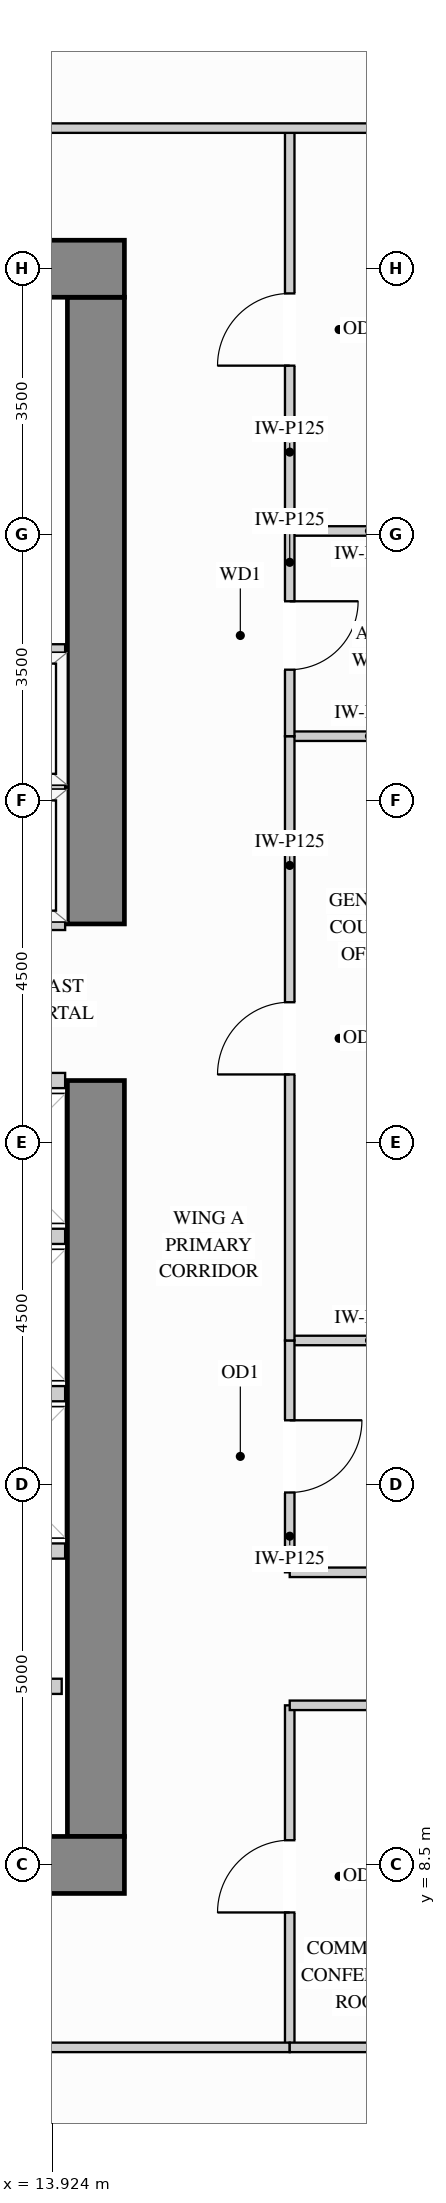
"""IFC4 building model, lengths in metres.
Left out: names, types, materials, properties, quantities, classifications, styles, units other than length and angle.
Written with IfcOpenShell. Run it as: python <this file> out.ifc"""

import sys

from ifc_helpers import new_model, si_unit, direction, frame, frame_2d, origin, place, context, subcontext, project, spatial, rectangle, extrude, source, transform, mapped, element, fill, save


model = new_model("IFC4")
c1 = context("Model", 3, precision=1e-05, world=origin(), true_north=direction((0.0, 1.0)))
c2 = subcontext(c1, "Body", "Model", "MODEL_VIEW")
j1 = project(units=[si_unit("LENGTHUNIT", "METRE"), si_unit("PLANEANGLEUNIT", "RADIAN")], contexts=[c1])
p1 = place(None, origin())
s1 = spatial("IfcSite", under=j1, at=p1, CompositionType="ELEMENT")
p2 = place(p1, origin())
s2 = spatial("IfcBuilding", under=s1, at=p2, CompositionType="ELEMENT")
p3 = place(p2, frame((0.0, 0.0, 88.2)))
s3 = spatial("IfcBuildingStorey", under=s2, at=p3, CompositionType="ELEMENT", Elevation=88.2)
m1 = source(origin(), c2, "Body", "SweptSolid", [
    extrude(rectangle(XDim=9.945, YDim=0.75, at=frame_2d((4.973, 0.0))), origin(), (0.0, 0.0, 1.0), 3.38),
])
p4 = place(p3, frame((14.5, 8.875, 0.0), z_axis=(0.0, 0.0, 1.0), x_axis=(0.0, 1.0, 0.0)))
e1 = element("IfcWall", 1, at=p4, inside=s3, PredefinedType="SHEAR", context=c2, shape_type="MappedRepresentation", body=[
    mapped(m1, transform((0.0, 0.0, 0.0), x_axis=(1.0, 0.0, 0.0), y_axis=(0.0, 1.0, 0.0), z_axis=(0.0, 0.0, 1.0))),
])
m2 = source(origin(), c2, "Body", "SweptSolid", [
    extrude(rectangle(XDim=8.245, YDim=0.75, at=frame_2d((4.123, 0.0))), origin(), (0.0, 0.0, 1.0), 3.38),
])
p5 = place(p3, frame((14.5, 20.88, 0.0), z_axis=(0.0, 0.0, 1.0), x_axis=(0.0, 1.0, 0.0)))
e2 = element("IfcWall", 2, at=p5, inside=s3, PredefinedType="SHEAR", context=c2, shape_type="MappedRepresentation", body=[
    mapped(m2, transform((0.0, 0.0, 0.0), x_axis=(1.0, 0.0, 0.0), y_axis=(0.0, 1.0, 0.0), z_axis=(0.0, 0.0, 1.0))),
])
m3 = source(origin(), c2, "Body", "SweptSolid", [
    extrude(rectangle(XDim=10.75, YDim=0.75, at=frame_2d((5.375, 0.0))), origin(), (0.0, 0.0, 1.0), 3.38),
])
for number, where, z_axis, x_axis in (
    (3, (4.125, 29.5, 0.0), (0.0, 0.0, 1.0), (1.0, 0.0, 0.0)),
    (4, (4.125, 8.5, 0.0), (0.0, 0.0, 1.0), (1.0, 0.0, 0.0)),
):
    element("IfcWall", number, at=place(p3, frame(where, z_axis=z_axis, x_axis=x_axis)), inside=s3, PredefinedType="SHEAR", context=c2, shape_type="MappedRepresentation", body=[
        mapped(m3, transform((0.0, 0.0, 0.0), x_axis=(1.0, 0.0, 0.0), y_axis=(0.0, 1.0, 0.0), z_axis=(0.0, 0.0, 1.0))),
    ])
m4 = source(origin(), c2, "Body", "SweptSolid", [
    extrude(rectangle(XDim=2.1, YDim=0.125, at=frame_2d((1.05, 0.0))), origin(), (0.0, 0.0, 1.0), 3.365),
])
p6 = place(p3, frame((17.05, 15.4, 0.0), z_axis=(0.0, 0.0, 1.0), x_axis=(1.0, 0.0, 0.0)))
e5 = element("IfcWall", 5, at=p6, inside=s3, PredefinedType="PARTITIONING", context=c2, shape_type="MappedRepresentation", body=[
    mapped(m4, transform((0.0, 0.0, 0.0), x_axis=(1.0, 0.0, 0.0), y_axis=(0.0, 1.0, 0.0), z_axis=(0.0, 0.0, 1.0))),
])
m5 = source(origin(), c2, "Body", "SweptSolid", [
    extrude(rectangle(XDim=2.098, YDim=0.125, at=frame_2d((1.049, 0.0))), origin(), (0.0, 0.0, 1.0), 3.365),
])
for number, where, z_axis, x_axis in (
    (6, (17.05, 23.35, 0.0), (0.0, 0.0, 1.0), (1.0, 0.0, 0.0)),
    (7, (17.05, 26.05, 0.0), (0.0, 0.0, 1.0), (1.0, 0.0, 0.0)),
):
    element("IfcWall", number, at=place(p3, frame(where, z_axis=z_axis, x_axis=x_axis)), inside=s3, PredefinedType="PARTITIONING", context=c2, shape_type="MappedRepresentation", body=[
        mapped(m5, transform((0.0, 0.0, 0.0), x_axis=(1.0, 0.0, 0.0), y_axis=(0.0, 1.0, 0.0), z_axis=(0.0, 0.0, 1.0))),
    ])
p7 = place(p3, frame((17.05, 12.35, 0.0), z_axis=(0.0, 0.0, 1.0), x_axis=(0.0, 1.0, 0.0)))
e8 = element("IfcWall", 8, at=p7, inside=s3, PredefinedType="PARTITIONING", context=c2, shape_type="SweptSolid", body=[
    extrude(rectangle(XDim=3.05, YDim=0.125, at=frame_2d((1.525, 0.0))), origin(), (0.0, 0.0, 1.0), 3.365),
])
p8 = place(p7, frame((1.05, 0.0, 0.0)))
e9 = element("IfcOpeningElement", 9, at=p8, cuts=e8, PredefinedType="OPENING", context=c2, shape_type="SweptSolid", body=[
    extrude(rectangle(XDim=0.95, YDim=2.15, at=frame_2d((0.475, 1.075))), frame((0.0, 0.073, 0.0), z_axis=(0.0, -1.0, 0.0), x_axis=(1.0, 0.0, 0.0)), (0.0, 0.0, 1.0), 0.145),
])
p9 = place(p3, frame((17.05, 15.4, 0.0), z_axis=(0.0, 0.0, 1.0), x_axis=(0.0, 1.0, 0.0)))
e10 = element("IfcWall", 10, at=p9, inside=s3, PredefinedType="PARTITIONING", context=c2, shape_type="SweptSolid", body=[
    extrude(rectangle(XDim=7.95, YDim=0.125, at=frame_2d((3.975, 0.0))), origin(), (0.0, 0.0, 1.0), 3.365),
])
p10 = place(p9, frame((3.5, 0.0, 0.0)))
e11 = element("IfcOpeningElement", 11, at=p10, cuts=e10, PredefinedType="OPENING", context=c2, shape_type="SweptSolid", body=[
    extrude(rectangle(XDim=0.95, YDim=2.15, at=frame_2d((0.475, 1.075))), frame((0.0, 0.073, 0.0), z_axis=(0.0, -1.0, 0.0), x_axis=(1.0, 0.0, 0.0)), (0.0, 0.0, 1.0), 0.145),
])
p11 = place(p3, frame((17.05, 26.05, 0.0), z_axis=(0.0, 0.0, 1.0), x_axis=(0.0, 1.0, 0.0)))
e12 = element("IfcWall", 12, at=p11, inside=s3, PredefinedType="PARTITIONING", context=c2, shape_type="SweptSolid", body=[
    extrude(rectangle(XDim=5.3, YDim=0.125, at=frame_2d((2.65, 0.0))), origin(), (0.0, 0.0, 1.0), 3.365),
])
p12 = place(p11, frame((2.175, 0.0, 0.0)))
e13 = element("IfcOpeningElement", 13, at=p12, cuts=e12, PredefinedType="OPENING", context=c2, shape_type="SweptSolid", body=[
    extrude(rectangle(XDim=0.95, YDim=2.15, at=frame_2d((0.475, 1.075))), frame((0.0, 0.073, 0.0), z_axis=(0.0, -1.0, 0.0), x_axis=(1.0, 0.0, 0.0)), (0.0, 0.0, 1.0), 0.145),
])
p13 = place(p3, frame((17.05, 6.1, 0.0), z_axis=(0.0, 0.0, 1.0), x_axis=(0.0, 1.0, 0.0)))
e14 = element("IfcWall", 14, at=p13, inside=s3, PredefinedType="PARTITIONING", context=c2, shape_type="SweptSolid", body=[
    extrude(rectangle(XDim=4.5, YDim=0.125, at=frame_2d((2.25, 0.0))), origin(), (0.0, 0.0, 1.0), 3.365),
])
p14 = place(p13, frame((1.775, 0.0, 0.0)))
e15 = element("IfcOpeningElement", 15, at=p14, cuts=e14, PredefinedType="OPENING", context=c2, shape_type="SweptSolid", body=[
    extrude(rectangle(XDim=0.95, YDim=2.15, at=frame_2d((0.475, 1.075))), frame((0.0, 0.073, 0.0), z_axis=(0.0, -1.0, 0.0), x_axis=(1.0, 0.0, 0.0)), (0.0, 0.0, 1.0), 0.145),
])
p15 = place(p3, frame((17.05, 23.35, 0.0), z_axis=(0.0, 0.0, 1.0), x_axis=(0.0, 1.0, 0.0)))
e16 = element("IfcWall", 16, at=p15, inside=s3, PredefinedType="PARTITIONING", context=c2, shape_type="SweptSolid", body=[
    extrude(rectangle(XDim=2.7, YDim=0.125, at=frame_2d((1.35, 0.0))), origin(), (0.0, 0.0, 1.0), 3.365),
])
p16 = place(p15, frame((0.875, 0.0, 0.0)))
e17 = element("IfcOpeningElement", 17, at=p16, cuts=e16, PredefinedType="OPENING", context=c2, shape_type="SweptSolid", body=[
    extrude(rectangle(XDim=0.9, YDim=2.15, at=frame_2d((0.45, 1.075))), frame((0.0, 0.073, 0.0), z_axis=(0.0, -1.0, 0.0), x_axis=(1.0, 0.0, 0.0)), (0.0, 0.0, 1.0), 0.145),
])
m6 = source(origin(), c2, "Body", "SweptSolid", [
    extrude(rectangle(XDim=5.798, YDim=0.125, at=frame_2d((2.899, 0.0))), origin(), (0.0, 0.0, 1.0), 3.365),
])
p17 = place(p3, frame((13.35, 31.35, 0.0), z_axis=(0.0, 0.0, 1.0), x_axis=(1.0, 0.0, 0.0)))
e18 = element("IfcWall", 18, at=p17, inside=s3, PredefinedType="PARTITIONING", context=c2, shape_type="MappedRepresentation", body=[
    mapped(m6, transform((0.0, 0.0, 0.0), x_axis=(1.0, 0.0, 0.0), y_axis=(0.0, 1.0, 0.0), z_axis=(0.0, 0.0, 1.0))),
])
m7 = source(origin(), c2, "Body", "SweptSolid", [
    extrude(rectangle(XDim=2.45, YDim=0.125, at=frame_2d((1.225, 0.0))), origin(), (0.0, 0.0, 1.0), 3.365),
])
for number, where, z_axis, x_axis in (
    (19, (17.05, 12.35, 0.0), (0.0, 0.0, 1.0), (1.0, 0.0, 0.0)),
    (20, (17.05, 10.6, 0.0), (0.0, 0.0, 1.0), (1.0, 0.0, 0.0)),
):
    element("IfcWall", number, at=place(p3, frame(where, z_axis=z_axis, x_axis=x_axis)), inside=s3, PredefinedType="PARTITIONING", context=c2, shape_type="MappedRepresentation", body=[
        mapped(m7, transform((0.0, 0.0, 0.0), x_axis=(1.0, 0.0, 0.0), y_axis=(0.0, 1.0, 0.0), z_axis=(0.0, 0.0, 1.0))),
    ])
p18 = place(p3, frame((9.551, 6.1, 0.0), z_axis=(0.0, 0.0, 1.0), x_axis=(1.0, 0.0, 0.0)))
e21 = element("IfcWall", 21, at=p18, inside=s3, PredefinedType="PARTITIONING", context=c2, shape_type="SweptSolid", body=[
    extrude(rectangle(XDim=7.499, YDim=0.125, at=frame_2d((3.75, 0.0))), origin(), (0.0, 0.0, 1.0), 3.365),
])
p19 = place(p18, frame((3.274, 0.0, 0.0)))
e22 = element("IfcOpeningElement", 22, at=p19, cuts=e21, PredefinedType="OPENING", context=c2, shape_type="SweptSolid", body=[
    extrude(rectangle(XDim=0.95, YDim=2.15, at=frame_2d((0.475, 1.075))), frame((0.0, 0.073, 0.0), z_axis=(0.0, -1.0, 0.0), x_axis=(1.0, 0.0, 0.0)), (0.0, 0.0, 1.0), 0.145),
])
p20 = place(p3, frame((17.05, 6.1, 0.0), z_axis=(0.0, 0.0, 1.0), x_axis=(1.0, 0.0, 0.0)))
e23 = element("IfcWall", 23, at=p20, inside=s3, PredefinedType="PARTITIONING", context=c2, shape_type="MappedRepresentation", body=[
    mapped(m5, transform((0.0, 0.0, 0.0), x_axis=(1.0, 0.0, 0.0), y_axis=(0.0, 1.0, 0.0), z_axis=(0.0, 0.0, 1.0))),
])
m8 = source(origin(), c2, "Body", "SweptSolid", [
    extrude(rectangle(XDim=1.63, YDim=0.2, at=frame_2d((0.815, 0.0))), origin(), (0.0, 0.0, 1.0), 3.365),
])
p21 = place(p3, frame((12.42, 10.85, 0.0), z_axis=(0.0, 0.0, 1.0), x_axis=(1.0, 0.0, 0.0)))
e24 = element("IfcWall", 24, at=p21, inside=s3, PredefinedType="PARTITIONING", context=c2, shape_type="MappedRepresentation", body=[
    mapped(m8, transform((0.0, 0.0, 0.0), x_axis=(1.0, 0.0, 0.0), y_axis=(0.0, 1.0, 0.0), z_axis=(0.0, 0.0, 1.0))),
])
m9 = source(origin(), c2, "Body", "SweptSolid", [
    extrude(rectangle(XDim=2.265, YDim=0.2, at=frame_2d((1.132, 0.0))), origin(), (0.0, 0.0, 1.0), 3.365),
])
for number, where, z_axis, x_axis in (
    (25, (11.83, 22.66, 0.0), (0.0, 0.0, 1.0), (1.0, 0.0, 0.0)),
    (26, (11.83, 20.9, 0.0), (0.0, 0.0, 1.0), (1.0, 0.0, 0.0)),
    (27, (11.83, 24.46, 0.0), (0.0, 0.0, 1.0), (1.0, 0.0, 0.0)),
):
    element("IfcWall", number, at=place(p3, frame(where, z_axis=z_axis, x_axis=x_axis)), inside=s3, PredefinedType="PARTITIONING", context=c2, shape_type="MappedRepresentation", body=[
        mapped(m9, transform((0.0, 0.0, 0.0), x_axis=(1.0, 0.0, 0.0), y_axis=(0.0, 1.0, 0.0), z_axis=(0.0, 0.0, 1.0))),
    ])
m10 = source(origin(), c2, "Body", "SweptSolid", [
    extrude(rectangle(XDim=1.865, YDim=0.2, at=frame_2d((0.933, 0.0))), origin(), (0.0, 0.0, 1.0), 3.365),
])
for number, where, z_axis, x_axis in (
    (28, (12.23, 14.7, 0.0), (0.0, 0.0, 1.0), (1.0, 0.0, 0.0)),
    (29, (12.23, 12.63, 0.0), (0.0, 0.0, 1.0), (1.0, 0.0, 0.0)),
    (30, (12.23, 16.77, 0.0), (0.0, 0.0, 1.0), (1.0, 0.0, 0.0)),
    (31, (12.23, 18.82, 0.0), (0.0, 0.0, 1.0), (1.0, 0.0, 0.0)),
):
    element("IfcWall", number, at=place(p3, frame(where, z_axis=z_axis, x_axis=x_axis)), inside=s3, PredefinedType="PARTITIONING", context=c2, shape_type="MappedRepresentation", body=[
        mapped(m10, transform((0.0, 0.0, 0.0), x_axis=(1.0, 0.0, 0.0), y_axis=(0.0, 1.0, 0.0), z_axis=(0.0, 0.0, 1.0))),
    ])
m11 = source(origin(), c2, "Body", "SweptSolid", [
    extrude(rectangle(XDim=0.95, YDim=2.15, at=frame_2d((0.475, 1.075))), frame((0.0, 0.025, 0.0), z_axis=(0.0, -1.0, 0.0), x_axis=(1.0, 0.0, 0.0)), (0.0, 0.0, 1.0), 0.05),
])
p22 = place(p14, origin())
e32 = element("IfcDoor", 32, at=p22, inside=s3, OperationType="SINGLE_SWING_LEFT", PredefinedType="DOOR", context=c2, shape_type="MappedRepresentation", body=[
    mapped(m11, transform((0.0, 0.0, 0.0), x_axis=(1.0, 0.0, 0.0), y_axis=(0.0, 1.0, 0.0), z_axis=(0.0, 0.0, 1.0))),
])
fill(e15, e32)
p23 = place(p8, origin())
e33 = element("IfcDoor", 33, at=p23, inside=s3, OperationType="SINGLE_SWING_RIGHT", PredefinedType="DOOR", context=c2, shape_type="MappedRepresentation", body=[
    mapped(m11, transform((0.0, 0.0, 0.0), x_axis=(1.0, 0.0, 0.0), y_axis=(0.0, 1.0, 0.0), z_axis=(0.0, 0.0, 1.0))),
])
fill(e9, e33)
p24 = place(p10, origin())
e34 = element("IfcDoor", 34, at=p24, inside=s3, OperationType="SINGLE_SWING_LEFT", PredefinedType="DOOR", context=c2, shape_type="MappedRepresentation", body=[
    mapped(m11, transform((0.0, 0.0, 0.0), x_axis=(1.0, 0.0, 0.0), y_axis=(0.0, 1.0, 0.0), z_axis=(0.0, 0.0, 1.0))),
])
fill(e11, e34)
p25 = place(p12, origin())
e35 = element("IfcDoor", 35, at=p25, inside=s3, OperationType="SINGLE_SWING_LEFT", PredefinedType="DOOR", context=c2, shape_type="MappedRepresentation", body=[
    mapped(m11, transform((0.0, 0.0, 0.0), x_axis=(1.0, 0.0, 0.0), y_axis=(0.0, 1.0, 0.0), z_axis=(0.0, 0.0, 1.0))),
])
fill(e13, e35)
m12 = source(origin(), c2, "Body", "SweptSolid", [
    extrude(rectangle(XDim=0.9, YDim=2.15, at=frame_2d((0.45, 1.075))), frame((0.0, 0.025, 0.0), z_axis=(0.0, -1.0, 0.0), x_axis=(1.0, 0.0, 0.0)), (0.0, 0.0, 1.0), 0.05),
])
p26 = place(p16, origin())
e36 = element("IfcDoor", 36, at=p26, inside=s3, OperationType="SINGLE_SWING_RIGHT", PredefinedType="DOOR", context=c2, shape_type="MappedRepresentation", body=[
    mapped(m12, transform((0.0, 0.0, 0.0), x_axis=(1.0, 0.0, 0.0), y_axis=(0.0, 1.0, 0.0), z_axis=(0.0, 0.0, 1.0))),
])
fill(e17, e36)
save(model, sys.argv[1])
